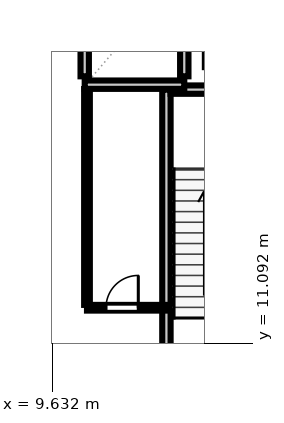
"""IFC4 building model, lengths in metres.
Left out: names, types, materials, properties, quantities, classifications, styles, units other than length and angle.
Written with IfcOpenShell. Run it as: python <this file> out.ifc"""

import sys

from ifc_helpers import new_model, si_unit, direction, frame, frame_2d, origin, place, context, subcontext, project, spatial, rectangle, extrude, element, fill, save


model = new_model("IFC4")
c1 = context("Model", 3, precision=1e-05, world=origin(), true_north=direction((0.0, 1.0)))
c2 = subcontext(c1, "Body", "Model", "MODEL_VIEW")
j1 = project(units=[si_unit("LENGTHUNIT", "METRE"), si_unit("PLANEANGLEUNIT", "RADIAN")], contexts=[c1])
p1 = place(None, origin())
s1 = spatial("IfcSite", under=j1, at=p1, CompositionType="ELEMENT")
p2 = place(p1, origin())
s2 = spatial("IfcBuilding", under=s1, at=p2, CompositionType="ELEMENT")
p3 = place(p2, frame((0.0, 0.0, 5.2)))
s3 = spatial("IfcBuildingStorey", under=s2, at=p3, CompositionType="ELEMENT", Elevation=5.2)
p4 = place(p3, frame((12.64, 10.05, 0.0), z_axis=(0.0, 0.0, 1.0), x_axis=(0.0, 1.0, 0.0)))
e1 = element("IfcWall", 1, at=p4, inside=s3, PredefinedType="SOLIDWALL", context=c2, shape_type="SweptSolid", body=[
    extrude(rectangle(XDim=7.71, YDim=0.22, at=frame_2d((3.855, 0.0))), origin(), (0.0, 0.0, 1.0), 4.86),
])
p5 = place(p3, frame((12.75, 17.76, 0.0), z_axis=(0.0, 0.0, 1.0), x_axis=(1.0, 0.0, 0.0)))
e2 = element("IfcWall", 2, at=p5, inside=s3, PredefinedType="SOLIDWALL", context=c2, shape_type="SweptSolid", body=[
    extrude(rectangle(XDim=3.6, YDim=0.22, at=frame_2d((1.8, 0.0))), origin(), (0.0, 0.0, 1.0), 4.86),
])
for number, where, z_axis, x_axis in (
    (3, (10.49, 18.11, 0.0), (0.0, 0.0, 1.0), (0.0, 1.0, 0.0)),
    (4, (13.11, 18.11, 0.0), (0.0, 0.0, 1.0), (0.0, 1.0, 0.0)),
):
    element("IfcWall", number, at=place(p3, frame(where, z_axis=z_axis, x_axis=x_axis)), inside=s3, PredefinedType="SOLIDWALL", context=c2, shape_type="SweptSolid", body=[
        extrude(rectangle(XDim=2.58, YDim=0.22, at=frame_2d((1.29, 0.0))), origin(), (0.0, 0.0, 1.0), 4.86),
    ])
p6 = place(p3, frame((10.49, 17.89, 0.0), z_axis=(0.0, 0.0, 1.0), x_axis=(1.0, 0.0, 0.0)))
e5 = element("IfcWall", 5, at=p6, inside=s3, PredefinedType="SOLIDWALL", context=c2, shape_type="SweptSolid", body=[
    extrude(rectangle(XDim=2.62, YDim=0.22, at=frame_2d((1.31, 0.0))), origin(), (0.0, 0.0, 1.0), 4.86),
])
p7 = place(p3, frame((10.55, 12.02, 0.0), z_axis=(0.0, 0.0, 1.0), x_axis=(1.0, 0.0, 0.0)))
e6 = element("IfcWall", 6, at=p7, inside=s3, PredefinedType="PARTITIONING", context=c2, shape_type="SweptSolid", body=[
    extrude(rectangle(XDim=2.08, YDim=0.15, at=frame_2d((1.04, 0.0))), origin(), (0.0, 0.0, 1.0), 4.86),
])
p8 = place(p7, frame((0.5, 0.0, 0.0)))
e7 = element("IfcOpeningElement", 7, at=p8, cuts=e6, PredefinedType="OPENING", context=c2, shape_type="SweptSolid", body=[
    extrude(rectangle(XDim=0.85, YDim=2.1, at=frame_2d((0.425, 1.05))), frame((0.0, 0.087, 0.0), z_axis=(0.0, -1.0, 0.0), x_axis=(1.0, 0.0, 0.0)), (0.0, 0.0, 1.0), 0.174),
])
p9 = place(p3, frame((10.55, 12.095, 0.0), z_axis=(0.0, 0.0, 1.0), x_axis=(0.0, 1.0, 0.0)))
e8 = element("IfcWall", 8, at=p9, inside=s3, PredefinedType="PARTITIONING", context=c2, shape_type="SweptSolid", body=[
    extrude(rectangle(XDim=5.68, YDim=0.15, at=frame_2d((2.84, 0.0))), origin(), (0.0, 0.0, 1.0), 4.86),
])
p10 = place(p8, origin())
e9 = element("IfcDoor", 9, at=p10, inside=s3, OperationType="SINGLE_SWING_RIGHT", PredefinedType="DOOR", context=c2, shape_type="SweptSolid", body=[
    extrude(rectangle(XDim=0.85, YDim=2.1, at=frame_2d((0.425, 1.05))), frame((0.0, 0.025, 0.0), z_axis=(0.0, -1.0, 0.0), x_axis=(1.0, 0.0, 0.0)), (0.0, 0.0, 1.0), 0.05),
])
fill(e7, e9)
save(model, sys.argv[1])
